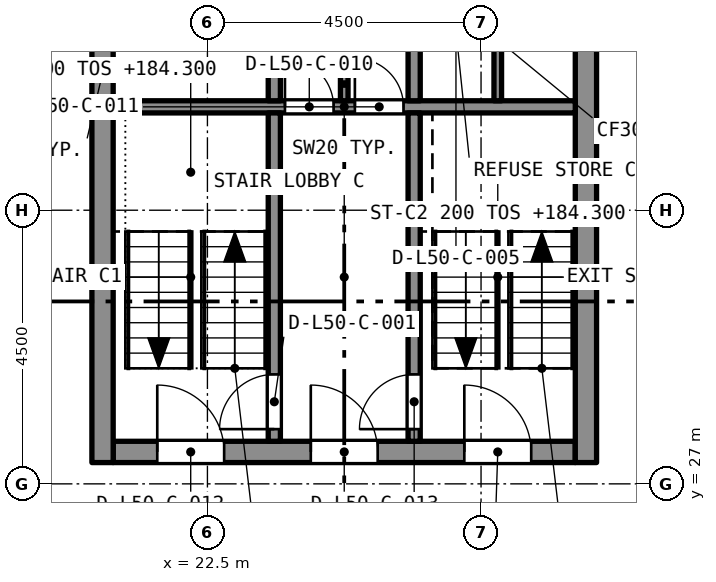
"""IFC4 building model, lengths in metres.
Left out: names, types, materials, properties, quantities, classifications, styles, units other than length and angle.
Written with IfcOpenShell. Run it as: python <this file> out.ifc"""

import sys

from ifc_helpers import new_model, si_unit, direction, frame, frame_2d, origin, place, context, subcontext, project, spatial, rectangle, extrude, element, fill, save


model = new_model("IFC4")
c1 = context("Model", 3, precision=1e-05, world=origin(), true_north=direction((0.0, 1.0)))
c2 = subcontext(c1, "Body", "Model", "MODEL_VIEW")
j1 = project(units=[si_unit("LENGTHUNIT", "METRE"), si_unit("PLANEANGLEUNIT", "RADIAN")], contexts=[c1])
p1 = place(None, origin())
s1 = spatial("IfcSite", under=j1, at=p1, CompositionType="ELEMENT")
p2 = place(p1, origin())
s2 = spatial("IfcBuilding", under=s1, at=p2, CompositionType="ELEMENT")
p3 = place(p2, frame((0.0, 0.0, 182.7)))
s3 = spatial("IfcBuildingStorey", under=s2, at=p3, CompositionType="ELEMENT", Elevation=182.7)
p4 = place(p3, frame((20.95, 27.525, 0.0), z_axis=(0.0, 0.0, 1.0), x_axis=(1.0, 0.0, 0.0)))
e1 = element("IfcWall", 1, at=p4, inside=s3, PredefinedType="SOLIDWALL", context=c2, shape_type="SweptSolid", body=[
    extrude(rectangle(XDim=7.6, YDim=0.35, at=frame_2d((3.8, 0.0))), origin(), (0.0, 0.0, 1.0), 3.2),
])
p5 = place(p4, frame((0.725, 0.0, 0.0)))
e2 = element("IfcOpeningElement", 2, at=p5, cuts=e1, PredefinedType="OPENING", context=c2, shape_type="SweptSolid", body=[
    extrude(rectangle(XDim=1.1, YDim=2.1, at=frame_2d((0.55, 1.05))), frame((0.0, 0.185, 0.0), z_axis=(0.0, -1.0, 0.0), x_axis=(1.0, 0.0, 0.0)), (0.0, 0.0, 1.0), 0.37),
])
p6 = place(p4, frame((3.25, 0.0, 0.0)))
e3 = element("IfcOpeningElement", 3, at=p6, cuts=e1, PredefinedType="OPENING", context=c2, shape_type="SweptSolid", body=[
    extrude(rectangle(XDim=1.1, YDim=2.1, at=frame_2d((0.55, 1.05))), frame((0.0, 0.185, 0.0), z_axis=(0.0, -1.0, 0.0), x_axis=(1.0, 0.0, 0.0)), (0.0, 0.0, 1.0), 0.37),
])
p7 = place(p4, frame((5.775, 0.0, 0.0)))
e4 = element("IfcOpeningElement", 4, at=p7, cuts=e1, PredefinedType="OPENING", context=c2, shape_type="SweptSolid", body=[
    extrude(rectangle(XDim=1.1, YDim=2.1, at=frame_2d((0.55, 1.05))), frame((0.0, 0.185, 0.0), z_axis=(0.0, -1.0, 0.0), x_axis=(1.0, 0.0, 0.0)), (0.0, 0.0, 1.0), 0.37),
])
p8 = place(p3, frame((20.775, 27.35, 0.0), z_axis=(0.0, 0.0, 1.0), x_axis=(0.0, 1.0, 0.0)))
e5 = element("IfcWall", 5, at=p8, inside=s3, PredefinedType="SOLIDWALL", context=c2, shape_type="SweptSolid", body=[
    extrude(rectangle(XDim=12.8, YDim=0.35, at=frame_2d((6.4, 0.0))), origin(), (0.0, 0.0, 1.0), 3.2),
])
p9 = place(p8, frame((8.6, 0.0, 0.0)))
e6 = element("IfcOpeningElement", 6, at=p9, cuts=e5, PredefinedType="OPENING", context=c2, shape_type="SweptSolid", body=[
    extrude(rectangle(XDim=1.2, YDim=2.1, at=frame_2d((0.6, 1.05))), frame((0.0, 0.185, 0.0), z_axis=(0.0, -1.0, 0.0), x_axis=(1.0, 0.0, 0.0)), (0.0, 0.0, 1.0), 0.37),
])
p10 = place(p3, frame((28.725, 27.35, 0.0), z_axis=(0.0, 0.0, 1.0), x_axis=(0.0, 1.0, 0.0)))
e7 = element("IfcWall", 7, at=p10, inside=s3, PredefinedType="SOLIDWALL", context=c2, shape_type="SweptSolid", body=[
    extrude(rectangle(XDim=12.8, YDim=0.35, at=frame_2d((6.4, 0.0))), origin(), (0.0, 0.0, 1.0), 3.2),
])
p11 = place(p10, frame((8.6, 0.0, 0.0)))
e8 = element("IfcOpeningElement", 8, at=p11, cuts=e7, PredefinedType="OPENING", context=c2, shape_type="SweptSolid", body=[
    extrude(rectangle(XDim=1.2, YDim=2.1, at=frame_2d((0.6, 1.05))), frame((0.0, 0.185, 0.0), z_axis=(0.0, -1.0, 0.0), x_axis=(1.0, 0.0, 0.0)), (0.0, 0.0, 1.0), 0.37),
])
p12 = place(p3, frame((20.95, 33.2, 0.0), z_axis=(0.0, 0.0, 1.0), x_axis=(1.0, 0.0, 0.0)))
e9 = element("IfcWall", 9, at=p12, inside=s3, PredefinedType="SOLIDWALL", context=c2, shape_type="SweptSolid", body=[
    extrude(rectangle(XDim=7.6, YDim=0.2, at=frame_2d((3.8, 0.0))), origin(), (0.0, 0.0, 1.0), 2.9),
])
p13 = place(p12, frame((2.825, 0.0, 0.0)))
e10 = element("IfcOpeningElement", 10, at=p13, cuts=e9, PredefinedType="OPENING", context=c2, shape_type="SweptSolid", body=[
    extrude(rectangle(XDim=0.8, YDim=2.1, at=frame_2d((0.4, 1.05))), frame((0.0, 0.11, 0.0), z_axis=(0.0, -1.0, 0.0), x_axis=(1.0, 0.0, 0.0)), (0.0, 0.0, 1.0), 0.22),
])
p14 = place(p12, frame((3.975, 0.0, 0.0)))
e11 = element("IfcOpeningElement", 11, at=p14, cuts=e9, PredefinedType="OPENING", context=c2, shape_type="SweptSolid", body=[
    extrude(rectangle(XDim=0.8, YDim=2.1, at=frame_2d((0.4, 1.05))), frame((0.0, 0.11, 0.0), z_axis=(0.0, -1.0, 0.0), x_axis=(1.0, 0.0, 0.0)), (0.0, 0.0, 1.0), 0.22),
])
p15 = place(p3, frame((23.6, 27.7, 0.0), z_axis=(0.0, 0.0, 1.0), x_axis=(0.0, 1.0, 0.0)))
e12 = element("IfcWall", 12, at=p15, inside=s3, PredefinedType="SOLIDWALL", context=c2, shape_type="SweptSolid", body=[
    extrude(rectangle(XDim=5.4, YDim=0.2, at=frame_2d((2.7, 0.0))), origin(), (0.0, 0.0, 1.0), 2.9),
])
p16 = place(p15, frame((0.2, 0.0, 0.0)))
e13 = element("IfcOpeningElement", 13, at=p16, cuts=e12, PredefinedType="OPENING", context=c2, shape_type="SweptSolid", body=[
    extrude(rectangle(XDim=0.9, YDim=2.1, at=frame_2d((0.45, 1.05))), frame((0.0, 0.11, 0.0), z_axis=(0.0, -1.0, 0.0), x_axis=(1.0, 0.0, 0.0)), (0.0, 0.0, 1.0), 0.22),
])
p17 = place(p3, frame((25.9, 27.7, 0.0), z_axis=(0.0, 0.0, 1.0), x_axis=(0.0, 1.0, 0.0)))
e14 = element("IfcWall", 14, at=p17, inside=s3, PredefinedType="SOLIDWALL", context=c2, shape_type="SweptSolid", body=[
    extrude(rectangle(XDim=5.4, YDim=0.2, at=frame_2d((2.7, 0.0))), origin(), (0.0, 0.0, 1.0), 2.9),
])
p18 = place(p17, frame((0.2, 0.0, 0.0)))
e15 = element("IfcOpeningElement", 15, at=p18, cuts=e14, PredefinedType="OPENING", context=c2, shape_type="SweptSolid", body=[
    extrude(rectangle(XDim=0.9, YDim=2.1, at=frame_2d((0.45, 1.05))), frame((0.0, 0.11, 0.0), z_axis=(0.0, -1.0, 0.0), x_axis=(1.0, 0.0, 0.0)), (0.0, 0.0, 1.0), 0.22),
])
for number, where, z_axis, x_axis in (
    (16, (23.6, 33.3, 0.0), (0.0, 0.0, 1.0), (0.0, 1.0, 0.0)),
    (17, (25.9, 33.3, 0.0), (0.0, 0.0, 1.0), (0.0, 1.0, 0.0)),
):
    element("IfcWall", number, at=place(p3, frame(where, z_axis=z_axis, x_axis=x_axis)), inside=s3, PredefinedType="SOLIDWALL", context=c2, shape_type="SweptSolid", body=[
        extrude(rectangle(XDim=2.3, YDim=0.2, at=frame_2d((1.15, 0.0))), origin(), (0.0, 0.0, 1.0), 2.9),
    ])
for number, where, z_axis, x_axis in (
    (18, (27.275, 33.3, 0.0), (0.0, 0.0, 1.0), (0.0, 1.0, 0.0)),
    (19, (24.75, 33.3, 0.0), (0.0, 0.0, 1.0), (0.0, 1.0, 0.0)),
):
    element("IfcWall", number, at=place(p3, frame(where, z_axis=z_axis, x_axis=x_axis)), inside=s3, PredefinedType="PARTITIONING", context=c2, shape_type="SweptSolid", body=[
        extrude(rectangle(XDim=2.3, YDim=0.125, at=frame_2d((1.15, 0.0))), origin(), (0.0, 0.0, 1.0), 2.9),
    ])
p19 = place(p16, origin())
e20 = element("IfcDoor", 20, at=p19, inside=s3, OperationType="SINGLE_SWING_LEFT", PredefinedType="DOOR", context=c2, shape_type="SweptSolid", body=[
    extrude(rectangle(XDim=0.9, YDim=2.1, at=frame_2d((0.45, 1.05))), frame((0.0, 0.025, 0.0), z_axis=(0.0, -1.0, 0.0), x_axis=(1.0, 0.0, 0.0)), (0.0, 0.0, 1.0), 0.05),
])
fill(e13, e20)
p20 = place(p18, origin())
e21 = element("IfcDoor", 21, at=p20, inside=s3, OperationType="SINGLE_SWING_LEFT", PredefinedType="DOOR", context=c2, shape_type="SweptSolid", body=[
    extrude(rectangle(XDim=0.9, YDim=2.1, at=frame_2d((0.45, 1.05))), frame((0.0, 0.025, 0.0), z_axis=(0.0, -1.0, 0.0), x_axis=(1.0, 0.0, 0.0)), (0.0, 0.0, 1.0), 0.05),
])
fill(e15, e21)
p21 = place(p13, origin())
e22 = element("IfcDoor", 22, at=p21, inside=s3, OperationType="SINGLE_SWING_LEFT", PredefinedType="DOOR", context=c2, shape_type="SweptSolid", body=[
    extrude(rectangle(XDim=0.8, YDim=2.1, at=frame_2d((0.4, 1.05))), frame((0.0, 0.025, 0.0), z_axis=(0.0, -1.0, 0.0), x_axis=(1.0, 0.0, 0.0)), (0.0, 0.0, 1.0), 0.05),
])
fill(e10, e22)
p22 = place(p14, origin())
e23 = element("IfcDoor", 23, at=p22, inside=s3, OperationType="SINGLE_SWING_LEFT", PredefinedType="DOOR", context=c2, shape_type="SweptSolid", body=[
    extrude(rectangle(XDim=0.8, YDim=2.1, at=frame_2d((0.4, 1.05))), frame((0.0, 0.025, 0.0), z_axis=(0.0, -1.0, 0.0), x_axis=(1.0, 0.0, 0.0)), (0.0, 0.0, 1.0), 0.05),
])
fill(e11, e23)
p23 = place(p5, origin())
e24 = element("IfcDoor", 24, at=p23, inside=s3, OperationType="SINGLE_SWING_LEFT", PredefinedType="DOOR", context=c2, shape_type="SweptSolid", body=[
    extrude(rectangle(XDim=1.1, YDim=2.1, at=frame_2d((0.55, 1.05))), frame((0.0, 0.025, 0.0), z_axis=(0.0, -1.0, 0.0), x_axis=(1.0, 0.0, 0.0)), (0.0, 0.0, 1.0), 0.05),
])
fill(e2, e24)
p24 = place(p6, origin())
e25 = element("IfcDoor", 25, at=p24, inside=s3, OperationType="SINGLE_SWING_LEFT", PredefinedType="DOOR", context=c2, shape_type="SweptSolid", body=[
    extrude(rectangle(XDim=1.1, YDim=2.1, at=frame_2d((0.55, 1.05))), frame((0.0, 0.025, 0.0), z_axis=(0.0, -1.0, 0.0), x_axis=(1.0, 0.0, 0.0)), (0.0, 0.0, 1.0), 0.05),
])
fill(e3, e25)
p25 = place(p7, origin())
e26 = element("IfcDoor", 26, at=p25, inside=s3, OperationType="SINGLE_SWING_LEFT", PredefinedType="DOOR", context=c2, shape_type="SweptSolid", body=[
    extrude(rectangle(XDim=1.1, YDim=2.1, at=frame_2d((0.55, 1.05))), frame((0.0, 0.025, 0.0), z_axis=(0.0, -1.0, 0.0), x_axis=(1.0, 0.0, 0.0)), (0.0, 0.0, 1.0), 0.05),
])
fill(e4, e26)
save(model, sys.argv[1])
